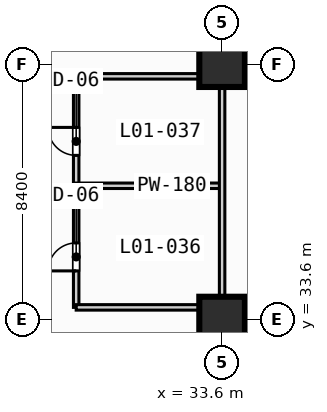
"""IFC4 building model, lengths in metres.
Left out: names, types, materials, properties, quantities, classifications, styles, units other than length and angle.
Written with IfcOpenShell. Run it as: python <this file> out.ifc"""

import sys

from ifc_helpers import new_model, si_unit, direction, frame, frame_2d, origin, origin_2d, place, context, subcontext, project, spatial, rectangle, extrude, element, fill, save


model = new_model("IFC4")
c1 = context("Model", 3, precision=1e-05, world=origin(), true_north=direction((0.0, 1.0)))
c2 = subcontext(c1, "Body", "Model", "MODEL_VIEW")
j1 = project(units=[si_unit("LENGTHUNIT", "METRE"), si_unit("PLANEANGLEUNIT", "RADIAN")], contexts=[c1])
p1 = place(None, origin())
s1 = spatial("IfcSite", under=j1, at=p1, CompositionType="ELEMENT")
p2 = place(p1, origin())
s2 = spatial("IfcBuilding", under=s1, at=p2, CompositionType="ELEMENT")
p3 = place(p2, frame((0.0, 0.0, 6.0)))
s3 = spatial("IfcBuildingStorey", under=s2, at=p3, CompositionType="ELEMENT", Elevation=6.0)
for number, where, z_axis, x_axis in (
    (1, (33.6, 33.6, 0.0), (0.0, 0.0, 1.0), (1.0, 0.0, 0.0)),
    (2, (33.6, 42.0, 0.0), (0.0, 0.0, 1.0), (1.0, 0.0, 0.0)),
):
    element("IfcColumn", number, at=place(p3, frame(where, z_axis=z_axis, x_axis=x_axis)), inside=s3, PredefinedType="COLUMN", context=c2, shape_type="SweptSolid", body=[
        extrude(rectangle(XDim=1.5, YDim=1.5, at=origin_2d()), origin(), (0.0, 0.0, 1.0), 4.8),
    ])
p4 = place(p3, frame((28.8, 34.0, 0.0), z_axis=(0.0, 0.0, 1.0), x_axis=(0.0, 1.0, 0.0)))
e3 = element("IfcWall", 3, at=p4, inside=s3, PredefinedType="PLUMBINGWALL", context=c2, shape_type="SweptSolid", body=[
    extrude(rectangle(XDim=7.6, YDim=0.18, at=frame_2d((3.8, 0.0))), origin(), (0.0, 0.0, 1.0), 4.45),
])
p5 = place(p4, frame((1.2, 0.0, 0.0)))
e4 = element("IfcOpeningElement", 4, at=p5, cuts=e3, PredefinedType="OPENING", context=c2, shape_type="SweptSolid", body=[
    extrude(rectangle(XDim=0.92, YDim=2.1, at=frame_2d((0.46, 1.05))), frame((0.0, 0.1, 0.0), z_axis=(0.0, -1.0, 0.0), x_axis=(1.0, 0.0, 0.0)), (0.0, 0.0, 1.0), 0.2),
])
p6 = place(p4, frame((5.0, 0.0, 0.0)))
e5 = element("IfcOpeningElement", 5, at=p6, cuts=e3, PredefinedType="OPENING", context=c2, shape_type="SweptSolid", body=[
    extrude(rectangle(XDim=0.92, YDim=2.1, at=frame_2d((0.46, 1.05))), frame((0.0, 0.1, 0.0), z_axis=(0.0, -1.0, 0.0), x_axis=(1.0, 0.0, 0.0)), (0.0, 0.0, 1.0), 0.2),
])
p7 = place(p3, frame((28.8, 38.0, 0.0), z_axis=(0.0, 0.0, 1.0), x_axis=(1.0, 0.0, 0.0)))
e6 = element("IfcWall", 6, at=p7, inside=s3, PredefinedType="PLUMBINGWALL", context=c2, shape_type="SweptSolid", body=[
    extrude(rectangle(XDim=4.8, YDim=0.18, at=frame_2d((2.4, 0.0))), origin(), (0.0, 0.0, 1.0), 4.45),
])
p8 = place(p3, frame((33.6, 34.0, 0.0), z_axis=(0.0, 0.0, 1.0), x_axis=(0.0, 1.0, 0.0)))
e7 = element("IfcWall", 7, at=p8, inside=s3, PredefinedType="PLUMBINGWALL", context=c2, shape_type="SweptSolid", body=[
    extrude(rectangle(XDim=7.6, YDim=0.18, at=frame_2d((3.8, 0.0))), origin(), (0.0, 0.0, 1.0), 3.6),
])
p9 = place(p3, frame((28.8, 34.0, 0.0), z_axis=(0.0, 0.0, 1.0), x_axis=(1.0, 0.0, 0.0)))
e8 = element("IfcWall", 8, at=p9, inside=s3, PredefinedType="PLUMBINGWALL", context=c2, shape_type="SweptSolid", body=[
    extrude(rectangle(XDim=4.8, YDim=0.18, at=frame_2d((2.4, 0.0))), origin(), (0.0, 0.0, 1.0), 3.6),
])
p10 = place(p3, frame((28.8, 41.6, 0.0), z_axis=(0.0, 0.0, 1.0), x_axis=(1.0, 0.0, 0.0)))
e9 = element("IfcWall", 9, at=p10, inside=s3, PredefinedType="PLUMBINGWALL", context=c2, shape_type="SweptSolid", body=[
    extrude(rectangle(XDim=4.8, YDim=0.18, at=frame_2d((2.4, 0.0))), origin(), (0.0, 0.0, 1.0), 4.45),
])
p11 = place(p5, origin())
e10 = element("IfcDoor", 10, at=p11, inside=s3, OperationType="SINGLE_SWING_LEFT", PredefinedType="DOOR", context=c2, shape_type="SweptSolid", body=[
    extrude(rectangle(XDim=0.92, YDim=2.1, at=frame_2d((0.46, 1.05))), frame((0.0, 0.025, 0.0), z_axis=(0.0, -1.0, 0.0), x_axis=(1.0, 0.0, 0.0)), (0.0, 0.0, 1.0), 0.05),
])
fill(e4, e10)
p12 = place(p6, origin())
e11 = element("IfcDoor", 11, at=p12, inside=s3, OperationType="SINGLE_SWING_RIGHT", PredefinedType="DOOR", context=c2, shape_type="SweptSolid", body=[
    extrude(rectangle(XDim=0.92, YDim=2.1, at=frame_2d((0.46, 1.05))), frame((0.0, 0.025, 0.0), z_axis=(0.0, -1.0, 0.0), x_axis=(1.0, 0.0, 0.0)), (0.0, 0.0, 1.0), 0.05),
])
fill(e5, e11)
save(model, sys.argv[1])
